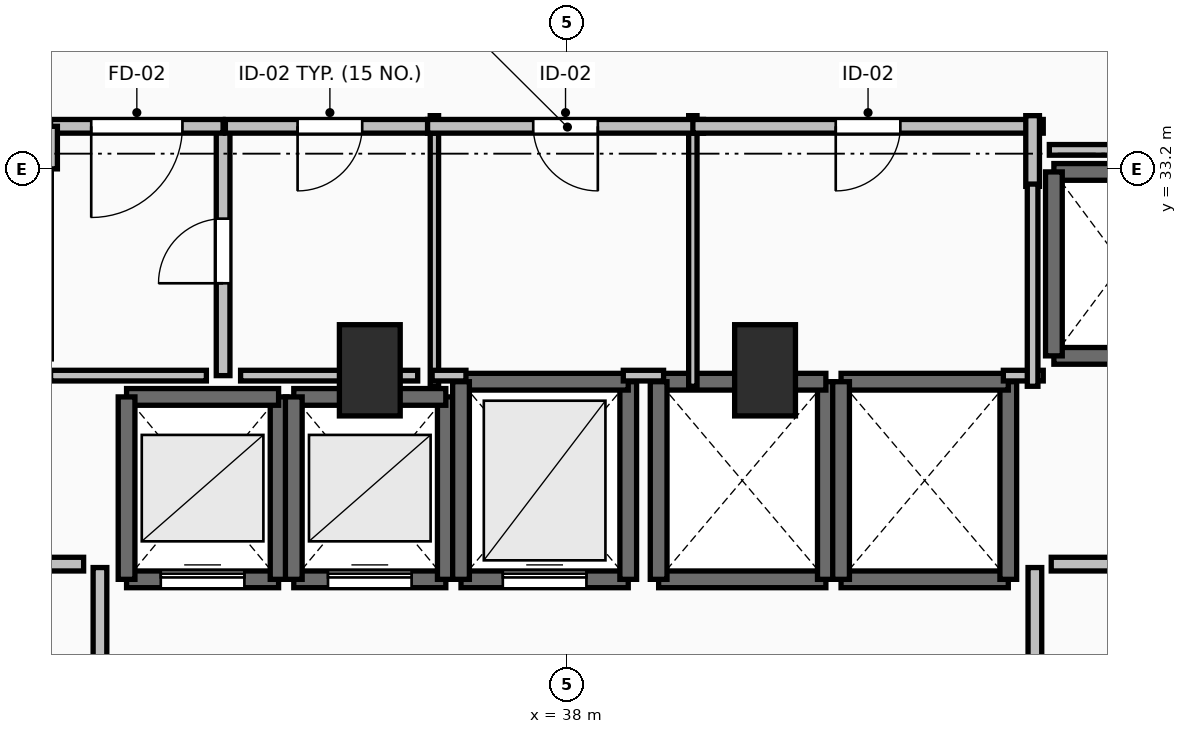
"""IFC4 building model, lengths in metres.
Left out: names, types, materials, properties, quantities, classifications, styles, units other than length and angle.
Written with IfcOpenShell. Run it as: python <this file> out.ifc"""

import sys

from ifc_helpers import new_model, si_unit, direction, frame, frame_2d, origin, origin_2d, place, context, subcontext, project, spatial, rectangle, extrude, element, fill, save


model = new_model("IFC4")
c1 = context("Model", 3, precision=1e-05, world=origin(), true_north=direction((0.0, 1.0)))
c2 = subcontext(c1, "Body", "Model", "MODEL_VIEW")
j1 = project(units=[si_unit("LENGTHUNIT", "METRE"), si_unit("PLANEANGLEUNIT", "RADIAN")], contexts=[c1])
p1 = place(None, origin())
s1 = spatial("IfcSite", under=j1, at=p1, CompositionType="ELEMENT")
p2 = place(p1, origin())
s2 = spatial("IfcBuilding", under=s1, at=p2, CompositionType="ELEMENT")
p3 = place(p2, frame((0.0, 0.0, 52.0)))
s3 = spatial("IfcBuildingStorey", under=s2, at=p3, CompositionType="ELEMENT", Elevation=52.0)
for number, where, z_axis, x_axis in (
    (1, (35.4, 30.55, 0.0), (0.0, 0.0, 1.0), (1.0, 0.0, 0.0)),
    (2, (40.6, 30.55, 0.0), (0.0, 0.0, 1.0), (1.0, 0.0, 0.0)),
):
    element("IfcColumn", number, at=place(p3, frame(where, z_axis=z_axis, x_axis=x_axis)), inside=s3, PredefinedType="PILASTER", context=c2, shape_type="SweptSolid", body=[
        extrude(rectangle(XDim=0.8, YDim=1.2, at=origin_2d()), origin(), (0.0, 0.0, 1.0), 3.5),
    ])
p4 = place(p3, frame((32.2, 27.8, 0.0), z_axis=(0.0, 0.0, 1.0), x_axis=(1.0, 0.0, 0.0)))
e3 = element("IfcWall", 3, at=p4, inside=s3, PredefinedType="SOLIDWALL", context=c2, shape_type="SweptSolid", body=[
    extrude(rectangle(XDim=2.0, YDim=0.22, at=frame_2d((1.0, 0.0))), origin(), (0.0, 0.0, 1.0), 3.24),
])
p5 = place(p4, frame((0.45, 0.0, 0.0)))
e4 = element("IfcOpeningElement", 4, at=p5, cuts=e3, PredefinedType="OPENING", context=c2, shape_type="SweptSolid", body=[
    extrude(rectangle(XDim=1.1, YDim=2.2, at=frame_2d((0.55, 1.1))), frame((0.0, 0.125, 0.0), z_axis=(0.0, -1.0, 0.0), x_axis=(1.0, 0.0, 0.0)), (0.0, 0.0, 1.0), 0.25),
])
p6 = place(p3, frame((34.2, 27.8, 0.0), z_axis=(0.0, 0.0, 1.0), x_axis=(0.0, 1.0, 0.0)))
e5 = element("IfcWall", 5, at=p6, inside=s3, PredefinedType="SOLIDWALL", context=c2, shape_type="SweptSolid", body=[
    extrude(rectangle(XDim=2.4, YDim=0.22, at=frame_2d((1.2, 0.0))), origin(), (0.0, 0.0, 1.0), 3.24),
])
p7 = place(p3, frame((34.2, 30.2, 0.0), z_axis=(0.0, 0.0, 1.0), x_axis=(-1.0, 0.0, 0.0)))
e6 = element("IfcWall", 6, at=p7, inside=s3, PredefinedType="SOLIDWALL", context=c2, shape_type="SweptSolid", body=[
    extrude(rectangle(XDim=2.0, YDim=0.22, at=frame_2d((1.0, 0.0))), origin(), (0.0, 0.0, 1.0), 3.24),
])
p8 = place(p3, frame((32.2, 30.2, 0.0), z_axis=(0.0, 0.0, 1.0), x_axis=(0.0, -1.0, 0.0)))
e7 = element("IfcWall", 7, at=p8, inside=s3, PredefinedType="SOLIDWALL", context=c2, shape_type="SweptSolid", body=[
    extrude(rectangle(XDim=2.4, YDim=0.22, at=frame_2d((1.2, 0.0))), origin(), (0.0, 0.0, 1.0), 3.24),
])
p9 = place(p3, frame((34.4, 27.8, 0.0), z_axis=(0.0, 0.0, 1.0), x_axis=(1.0, 0.0, 0.0)))
e8 = element("IfcWall", 8, at=p9, inside=s3, PredefinedType="SOLIDWALL", context=c2, shape_type="SweptSolid", body=[
    extrude(rectangle(XDim=2.0, YDim=0.22, at=frame_2d((1.0, 0.0))), origin(), (0.0, 0.0, 1.0), 3.24),
])
p10 = place(p9, frame((0.45, 0.0, 0.0)))
e9 = element("IfcOpeningElement", 9, at=p10, cuts=e8, PredefinedType="OPENING", context=c2, shape_type="SweptSolid", body=[
    extrude(rectangle(XDim=1.1, YDim=2.2, at=frame_2d((0.55, 1.1))), frame((0.0, 0.125, 0.0), z_axis=(0.0, -1.0, 0.0), x_axis=(1.0, 0.0, 0.0)), (0.0, 0.0, 1.0), 0.25),
])
p11 = place(p3, frame((36.4, 27.8, 0.0), z_axis=(0.0, 0.0, 1.0), x_axis=(0.0, 1.0, 0.0)))
e10 = element("IfcWall", 10, at=p11, inside=s3, PredefinedType="SOLIDWALL", context=c2, shape_type="SweptSolid", body=[
    extrude(rectangle(XDim=2.4, YDim=0.22, at=frame_2d((1.2, 0.0))), origin(), (0.0, 0.0, 1.0), 3.24),
])
p12 = place(p3, frame((36.4, 30.2, 0.0), z_axis=(0.0, 0.0, 1.0), x_axis=(-1.0, 0.0, 0.0)))
e11 = element("IfcWall", 11, at=p12, inside=s3, PredefinedType="SOLIDWALL", context=c2, shape_type="SweptSolid", body=[
    extrude(rectangle(XDim=2.0, YDim=0.22, at=frame_2d((1.0, 0.0))), origin(), (0.0, 0.0, 1.0), 3.24),
])
p13 = place(p3, frame((34.4, 30.2, 0.0), z_axis=(0.0, 0.0, 1.0), x_axis=(0.0, -1.0, 0.0)))
e12 = element("IfcWall", 12, at=p13, inside=s3, PredefinedType="SOLIDWALL", context=c2, shape_type="SweptSolid", body=[
    extrude(rectangle(XDim=2.4, YDim=0.22, at=frame_2d((1.2, 0.0))), origin(), (0.0, 0.0, 1.0), 3.24),
])
p14 = place(p3, frame((36.6, 27.8, 0.0), z_axis=(0.0, 0.0, 1.0), x_axis=(1.0, 0.0, 0.0)))
e13 = element("IfcWall", 13, at=p14, inside=s3, PredefinedType="SOLIDWALL", context=c2, shape_type="SweptSolid", body=[
    extrude(rectangle(XDim=2.2, YDim=0.22, at=frame_2d((1.1, 0.0))), origin(), (0.0, 0.0, 1.0), 3.24),
])
p15 = place(p14, frame((0.55, 0.0, 0.0)))
e14 = element("IfcOpeningElement", 14, at=p15, cuts=e13, PredefinedType="OPENING", context=c2, shape_type="SweptSolid", body=[
    extrude(rectangle(XDim=1.1, YDim=2.2, at=frame_2d((0.55, 1.1))), frame((0.0, 0.125, 0.0), z_axis=(0.0, -1.0, 0.0), x_axis=(1.0, 0.0, 0.0)), (0.0, 0.0, 1.0), 0.25),
])
p16 = place(p3, frame((38.8, 27.8, 0.0), z_axis=(0.0, 0.0, 1.0), x_axis=(0.0, 1.0, 0.0)))
e15 = element("IfcWall", 15, at=p16, inside=s3, PredefinedType="SOLIDWALL", context=c2, shape_type="SweptSolid", body=[
    extrude(rectangle(XDim=2.6, YDim=0.22, at=frame_2d((1.3, 0.0))), origin(), (0.0, 0.0, 1.0), 3.24),
])
p17 = place(p3, frame((38.8, 30.4, 0.0), z_axis=(0.0, 0.0, 1.0), x_axis=(-1.0, 0.0, 0.0)))
e16 = element("IfcWall", 16, at=p17, inside=s3, PredefinedType="SOLIDWALL", context=c2, shape_type="SweptSolid", body=[
    extrude(rectangle(XDim=2.2, YDim=0.22, at=frame_2d((1.1, 0.0))), origin(), (0.0, 0.0, 1.0), 3.24),
])
p18 = place(p3, frame((36.6, 30.4, 0.0), z_axis=(0.0, 0.0, 1.0), x_axis=(0.0, -1.0, 0.0)))
e17 = element("IfcWall", 17, at=p18, inside=s3, PredefinedType="SOLIDWALL", context=c2, shape_type="SweptSolid", body=[
    extrude(rectangle(XDim=2.6, YDim=0.22, at=frame_2d((1.3, 0.0))), origin(), (0.0, 0.0, 1.0), 3.24),
])
p19 = place(p3, frame((39.2, 27.8, 0.0), z_axis=(0.0, 0.0, 1.0), x_axis=(1.0, 0.0, 0.0)))
e18 = element("IfcWall", 18, at=p19, inside=s3, PredefinedType="SOLIDWALL", context=c2, shape_type="SweptSolid", body=[
    extrude(rectangle(XDim=2.2, YDim=0.22, at=frame_2d((1.1, 0.0))), origin(), (0.0, 0.0, 1.0), 3.24),
])
p20 = place(p3, frame((41.4, 27.8, 0.0), z_axis=(0.0, 0.0, 1.0), x_axis=(0.0, 1.0, 0.0)))
e19 = element("IfcWall", 19, at=p20, inside=s3, PredefinedType="SOLIDWALL", context=c2, shape_type="SweptSolid", body=[
    extrude(rectangle(XDim=2.6, YDim=0.22, at=frame_2d((1.3, 0.0))), origin(), (0.0, 0.0, 1.0), 3.24),
])
p21 = place(p3, frame((41.4, 30.4, 0.0), z_axis=(0.0, 0.0, 1.0), x_axis=(-1.0, 0.0, 0.0)))
e20 = element("IfcWall", 20, at=p21, inside=s3, PredefinedType="SOLIDWALL", context=c2, shape_type="SweptSolid", body=[
    extrude(rectangle(XDim=2.2, YDim=0.22, at=frame_2d((1.1, 0.0))), origin(), (0.0, 0.0, 1.0), 3.24),
])
p22 = place(p3, frame((39.2, 30.4, 0.0), z_axis=(0.0, 0.0, 1.0), x_axis=(0.0, -1.0, 0.0)))
e21 = element("IfcWall", 21, at=p22, inside=s3, PredefinedType="SOLIDWALL", context=c2, shape_type="SweptSolid", body=[
    extrude(rectangle(XDim=2.6, YDim=0.22, at=frame_2d((1.3, 0.0))), origin(), (0.0, 0.0, 1.0), 3.24),
])
p23 = place(p3, frame((41.6, 27.8, 0.0), z_axis=(0.0, 0.0, 1.0), x_axis=(1.0, 0.0, 0.0)))
e22 = element("IfcWall", 22, at=p23, inside=s3, PredefinedType="SOLIDWALL", context=c2, shape_type="SweptSolid", body=[
    extrude(rectangle(XDim=2.2, YDim=0.22, at=frame_2d((1.1, 0.0))), origin(), (0.0, 0.0, 1.0), 3.24),
])
p24 = place(p3, frame((43.8, 27.8, 0.0), z_axis=(0.0, 0.0, 1.0), x_axis=(0.0, 1.0, 0.0)))
e23 = element("IfcWall", 23, at=p24, inside=s3, PredefinedType="SOLIDWALL", context=c2, shape_type="SweptSolid", body=[
    extrude(rectangle(XDim=2.6, YDim=0.22, at=frame_2d((1.3, 0.0))), origin(), (0.0, 0.0, 1.0), 3.24),
])
p25 = place(p3, frame((43.8, 30.4, 0.0), z_axis=(0.0, 0.0, 1.0), x_axis=(-1.0, 0.0, 0.0)))
e24 = element("IfcWall", 24, at=p25, inside=s3, PredefinedType="SOLIDWALL", context=c2, shape_type="SweptSolid", body=[
    extrude(rectangle(XDim=2.2, YDim=0.22, at=frame_2d((1.1, 0.0))), origin(), (0.0, 0.0, 1.0), 3.24),
])
p26 = place(p3, frame((41.6, 30.4, 0.0), z_axis=(0.0, 0.0, 1.0), x_axis=(0.0, -1.0, 0.0)))
e25 = element("IfcWall", 25, at=p26, inside=s3, PredefinedType="SOLIDWALL", context=c2, shape_type="SweptSolid", body=[
    extrude(rectangle(XDim=2.6, YDim=0.22, at=frame_2d((1.3, 0.0))), origin(), (0.0, 0.0, 1.0), 3.24),
])
for number, where, z_axis, x_axis in (
    (26, (44.4, 30.74, 0.0), (0.0, 0.0, 1.0), (1.0, 0.0, 0.0)),
    (27, (46.2, 33.16, 0.0), (0.0, 0.0, 1.0), (-1.0, 0.0, 0.0)),
):
    element("IfcWall", number, at=place(p3, frame(where, z_axis=z_axis, x_axis=x_axis)), inside=s3, PredefinedType="SOLIDWALL", context=c2, shape_type="SweptSolid", body=[
        extrude(rectangle(XDim=1.8, YDim=0.22, at=frame_2d((0.9, 0.0))), origin(), (0.0, 0.0, 1.0), 3.24),
    ])
p27 = place(p3, frame((44.4, 33.16, 0.0), z_axis=(0.0, 0.0, 1.0), x_axis=(0.0, -1.0, 0.0)))
e28 = element("IfcWall", 28, at=p27, inside=s3, PredefinedType="SOLIDWALL", context=c2, shape_type="SweptSolid", body=[
    extrude(rectangle(XDim=2.42, YDim=0.22, at=frame_2d((1.21, 0.0))), origin(), (0.0, 0.0, 1.0), 3.24),
])
p28 = place(p3, frame((31.85, 24.045, 0.0), z_axis=(0.0, 0.0, 1.0), x_axis=(0.0, 1.0, 0.0)))
e29 = element("IfcWall", 29, at=p28, inside=s3, PredefinedType="PARTITIONING", context=c2, shape_type="SweptSolid", body=[
    extrude(rectangle(XDim=3.91, YDim=0.18, at=frame_2d((1.955, 0.0))), origin(), (0.0, 0.0, 1.0), 3.24),
])
p29 = place(p28, frame((1.355, 0.0, 0.0)))
e30 = element("IfcOpeningElement", 30, at=p29, cuts=e29, PredefinedType="OPENING", context=c2, shape_type="SweptSolid", body=[
    extrude(rectangle(XDim=1.2, YDim=2.15, at=frame_2d((0.6, 1.075))), frame((0.0, 0.105, 0.0), z_axis=(0.0, -1.0, 0.0), x_axis=(1.0, 0.0, 0.0)), (0.0, 0.0, 1.0), 0.21),
])
p30 = place(p3, frame((44.15, 27.955, 0.0), z_axis=(0.0, 0.0, 1.0), x_axis=(0.0, -1.0, 0.0)))
e31 = element("IfcWall", 31, at=p30, inside=s3, PredefinedType="PARTITIONING", context=c2, shape_type="SweptSolid", body=[
    extrude(rectangle(XDim=3.91, YDim=0.18, at=frame_2d((1.955, 0.0))), origin(), (0.0, 0.0, 1.0), 3.24),
])
p31 = place(p30, frame((1.355, 0.0, 0.0)))
e32 = element("IfcOpeningElement", 32, at=p31, cuts=e31, PredefinedType="OPENING", context=c2, shape_type="SweptSolid", body=[
    extrude(rectangle(XDim=1.2, YDim=2.15, at=frame_2d((0.6, 1.075))), frame((0.0, 0.105, 0.0), z_axis=(0.0, -1.0, 0.0), x_axis=(1.0, 0.0, 0.0)), (0.0, 0.0, 1.0), 0.21),
])
p32 = place(p3, frame((33.47, 30.48, 0.0), z_axis=(0.0, 0.0, 1.0), x_axis=(0.0, 1.0, 0.0)))
e33 = element("IfcWall", 33, at=p32, inside=s3, PredefinedType="PARTITIONING", context=c2, shape_type="SweptSolid", body=[
    extrude(rectangle(XDim=3.28, YDim=0.18, at=frame_2d((1.64, 0.0))), origin(), (0.0, 0.0, 1.0), 3.24),
])
p33 = place(p32, frame((1.215, 0.0, 0.0)))
e34 = element("IfcOpeningElement", 34, at=p33, cuts=e33, PredefinedType="OPENING", context=c2, shape_type="SweptSolid", body=[
    extrude(rectangle(XDim=0.85, YDim=2.1, at=frame_2d((0.425, 1.05))), frame((0.0, 0.105, 0.0), z_axis=(0.0, -1.0, 0.0), x_axis=(1.0, 0.0, 0.0)), (0.0, 0.0, 1.0), 0.21),
])
p34 = place(p3, frame((33.47, 33.76, 0.0), z_axis=(0.0, 0.0, 1.0), x_axis=(-1.0, 0.0, 0.0)))
e35 = element("IfcWall", 35, at=p34, inside=s3, PredefinedType="PARTITIONING", context=c2, shape_type="SweptSolid", body=[
    extrude(rectangle(XDim=2.27, YDim=0.18, at=frame_2d((1.135, 0.0))), origin(), (0.0, 0.0, 1.0), 3.24),
])
p35 = place(p34, frame((0.535, 0.0, 0.0)))
e36 = element("IfcOpeningElement", 36, at=p35, cuts=e35, PredefinedType="OPENING", context=c2, shape_type="SweptSolid", body=[
    extrude(rectangle(XDim=1.2, YDim=2.15, at=frame_2d((0.6, 1.075))), frame((0.0, 0.105, 0.0), z_axis=(0.0, -1.0, 0.0), x_axis=(1.0, 0.0, 0.0)), (0.0, 0.0, 1.0), 0.21),
])
p36 = place(p3, frame((31.2, 33.76, 0.0), z_axis=(0.0, 0.0, 1.0), x_axis=(0.0, -1.0, 0.0)))
e37 = element("IfcWall", 37, at=p36, inside=s3, PredefinedType="PARTITIONING", context=c2, shape_type="SweptSolid", body=[
    extrude(rectangle(XDim=0.56, YDim=0.18, at=frame_2d((0.28, 0.0))), origin(), (0.0, 0.0, 1.0), 3.24),
])
p37 = place(p3, frame((36.25, 30.34, 0.0), z_axis=(0.0, 0.0, 1.0), x_axis=(0.0, 1.0, 0.0)))
e38 = element("IfcWall", 38, at=p37, inside=s3, PredefinedType="PARTITIONING", context=c2, shape_type="SweptSolid", body=[
    extrude(rectangle(XDim=3.56, YDim=0.11, at=frame_2d((1.78, 0.0))), origin(), (0.0, 0.0, 1.0), 2.432),
])
p38 = place(p3, frame((36.25, 33.76, 0.0), z_axis=(0.0, 0.0, 1.0), x_axis=(-1.0, 0.0, 0.0)))
e39 = element("IfcWall", 39, at=p38, inside=s3, PredefinedType="PARTITIONING", context=c2, shape_type="SweptSolid", body=[
    extrude(rectangle(XDim=2.75, YDim=0.18, at=frame_2d((1.375, 0.0))), origin(), (0.0, 0.0, 1.0), 3.24),
])
p39 = place(p38, frame((0.95, 0.0, 0.0)))
e40 = element("IfcOpeningElement", 40, at=p39, cuts=e39, PredefinedType="OPENING", context=c2, shape_type="SweptSolid", body=[
    extrude(rectangle(XDim=0.85, YDim=2.1, at=frame_2d((0.425, 1.05))), frame((0.0, 0.105, 0.0), z_axis=(0.0, -1.0, 0.0), x_axis=(1.0, 0.0, 0.0)), (0.0, 0.0, 1.0), 0.21),
])
p40 = place(p3, frame((39.65, 30.34, 0.0), z_axis=(0.0, 0.0, 1.0), x_axis=(0.0, 1.0, 0.0)))
e41 = element("IfcWall", 41, at=p40, inside=s3, PredefinedType="PARTITIONING", context=c2, shape_type="SweptSolid", body=[
    extrude(rectangle(XDim=3.56, YDim=0.11, at=frame_2d((1.78, 0.0))), origin(), (0.0, 0.0, 1.0), 2.432),
])
p41 = place(p3, frame((39.79, 33.76, 0.0), z_axis=(0.0, 0.0, 1.0), x_axis=(-1.0, 0.0, 0.0)))
e42 = element("IfcWall", 42, at=p41, inside=s3, PredefinedType="PARTITIONING", context=c2, shape_type="SweptSolid", body=[
    extrude(rectangle(XDim=3.63, YDim=0.18, at=frame_2d((1.815, 0.0))), origin(), (0.0, 0.0, 1.0), 3.24),
])
p42 = place(p41, frame((1.39, 0.0, 0.0)))
e43 = element("IfcOpeningElement", 43, at=p42, cuts=e42, PredefinedType="OPENING", context=c2, shape_type="SweptSolid", body=[
    extrude(rectangle(XDim=0.85, YDim=2.1, at=frame_2d((0.425, 1.05))), frame((0.0, 0.105, 0.0), z_axis=(0.0, -1.0, 0.0), x_axis=(1.0, 0.0, 0.0)), (0.0, 0.0, 1.0), 0.21),
])
p43 = place(p3, frame((44.26, 33.76, 0.0), z_axis=(0.0, 0.0, 1.0), x_axis=(-1.0, 0.0, 0.0)))
e44 = element("IfcWall", 44, at=p43, inside=s3, PredefinedType="PARTITIONING", context=c2, shape_type="SweptSolid", body=[
    extrude(rectangle(XDim=4.61, YDim=0.18, at=frame_2d((2.305, 0.0))), origin(), (0.0, 0.0, 1.0), 3.24),
])
p44 = place(p43, frame((1.88, 0.0, 0.0)))
e45 = element("IfcOpeningElement", 45, at=p44, cuts=e44, PredefinedType="OPENING", context=c2, shape_type="SweptSolid", body=[
    extrude(rectangle(XDim=0.85, YDim=2.1, at=frame_2d((0.425, 1.05))), frame((0.0, 0.105, 0.0), z_axis=(0.0, -1.0, 0.0), x_axis=(1.0, 0.0, 0.0)), (0.0, 0.0, 1.0), 0.21),
])
p45 = place(p3, frame((44.12, 32.97, 0.0), z_axis=(0.0, 0.0, 1.0), x_axis=(0.0, 1.0, 0.0)))
e46 = element("IfcWall", 46, at=p45, inside=s3, PredefinedType="PARTITIONING", context=c2, shape_type="SweptSolid", body=[
    extrude(rectangle(XDim=0.93, YDim=0.18, at=frame_2d((0.465, 0.0))), origin(), (0.0, 0.0, 1.0), 3.24),
])
for number, where, z_axis, x_axis in (
    (47, (31.635, 28.0, 0.0), (0.0, 0.0, 1.0), (-1.0, 0.0, 0.0)),
    (48, (45.28, 28.0, 0.0), (0.0, 0.0, 1.0), (-1.0, 0.0, 0.0)),
):
    element("IfcWall", number, at=place(p3, frame(where, z_axis=z_axis, x_axis=x_axis)), inside=s3, PredefinedType="PARTITIONING", context=c2, shape_type="SweptSolid", body=[
        extrude(rectangle(XDim=0.915, YDim=0.18, at=frame_2d((0.458, 0.0))), origin(), (0.0, 0.0, 1.0), 3.24),
    ])
p46 = place(p3, frame((31.2, 30.48, 0.0), z_axis=(0.0, 0.0, 1.0), x_axis=(1.0, 0.0, 0.0)))
e49 = element("IfcWall", 49, at=p46, inside=s3, PredefinedType="PARTITIONING", context=c2, shape_type="SweptSolid", body=[
    extrude(rectangle(XDim=2.05, YDim=0.14, at=frame_2d((1.025, 0.0))), origin(), (0.0, 0.0, 1.0), 3.24),
])
p47 = place(p3, frame((33.7, 30.48, 0.0), z_axis=(0.0, 0.0, 1.0), x_axis=(1.0, 0.0, 0.0)))
e50 = element("IfcWall", 50, at=p47, inside=s3, PredefinedType="PARTITIONING", context=c2, shape_type="SweptSolid", body=[
    extrude(rectangle(XDim=2.33, YDim=0.14, at=frame_2d((1.165, 0.0))), origin(), (0.0, 0.0, 1.0), 2.432),
])
p48 = place(p3, frame((36.22, 30.48, 0.0), z_axis=(0.0, 0.0, 1.0), x_axis=(1.0, 0.0, 0.0)))
e51 = element("IfcWall", 51, at=p48, inside=s3, PredefinedType="PARTITIONING", context=c2, shape_type="SweptSolid", body=[
    extrude(rectangle(XDim=0.445, YDim=0.14, at=frame_2d((0.223, 0.0))), origin(), (0.0, 0.0, 1.0), 2.432),
])
p49 = place(p3, frame((38.735, 30.48, 0.0), z_axis=(0.0, 0.0, 1.0), x_axis=(1.0, 0.0, 0.0)))
e52 = element("IfcWall", 52, at=p49, inside=s3, PredefinedType="PARTITIONING", context=c2, shape_type="SweptSolid", body=[
    extrude(rectangle(XDim=0.53, YDim=0.14, at=frame_2d((0.265, 0.0))), origin(), (0.0, 0.0, 1.0), 2.432),
])
p50 = place(p3, frame((43.735, 30.48, 0.0), z_axis=(0.0, 0.0, 1.0), x_axis=(1.0, 0.0, 0.0)))
e53 = element("IfcWall", 53, at=p50, inside=s3, PredefinedType="PARTITIONING", context=c2, shape_type="SweptSolid", body=[
    extrude(rectangle(XDim=0.525, YDim=0.14, at=frame_2d((0.262, 0.0))), origin(), (0.0, 0.0, 1.0), 3.24),
])
p51 = place(p3, frame((44.12, 30.34, 0.0), z_axis=(0.0, 0.0, 1.0), x_axis=(0.0, 1.0, 0.0)))
e54 = element("IfcWall", 54, at=p51, inside=s3, PredefinedType="PARTITIONING", context=c2, shape_type="SweptSolid", body=[
    extrude(rectangle(XDim=2.66, YDim=0.14, at=frame_2d((1.33, 0.0))), origin(), (0.0, 0.0, 1.0), 3.24),
])
p52 = place(p3, frame((44.34, 33.45, 0.0), z_axis=(0.0, 0.0, 1.0), x_axis=(1.0, 0.0, 0.0)))
e55 = element("IfcWall", 55, at=p52, inside=s3, PredefinedType="PARTITIONING", context=c2, shape_type="SweptSolid", body=[
    extrude(rectangle(XDim=4.21, YDim=0.14, at=frame_2d((2.105, 0.0))), origin(), (0.0, 0.0, 1.0), 2.432),
])
p53 = place(p5, origin())
e56 = element("IfcDoor", 56, at=p53, inside=s3, OperationType="SLIDING_TO_LEFT", PredefinedType="DOOR", context=c2, shape_type="SweptSolid", body=[
    extrude(rectangle(XDim=1.1, YDim=2.2, at=frame_2d((0.55, 1.1))), frame((0.0, 0.025, 0.0), z_axis=(0.0, -1.0, 0.0), x_axis=(1.0, 0.0, 0.0)), (0.0, 0.0, 1.0), 0.05),
])
fill(e4, e56)
p54 = place(p10, origin())
e57 = element("IfcDoor", 57, at=p54, inside=s3, OperationType="SLIDING_TO_LEFT", PredefinedType="DOOR", context=c2, shape_type="SweptSolid", body=[
    extrude(rectangle(XDim=1.1, YDim=2.2, at=frame_2d((0.55, 1.1))), frame((0.0, 0.025, 0.0), z_axis=(0.0, -1.0, 0.0), x_axis=(1.0, 0.0, 0.0)), (0.0, 0.0, 1.0), 0.05),
])
fill(e9, e57)
p55 = place(p15, origin())
e58 = element("IfcDoor", 58, at=p55, inside=s3, OperationType="SLIDING_TO_LEFT", PredefinedType="DOOR", context=c2, shape_type="SweptSolid", body=[
    extrude(rectangle(XDim=1.1, YDim=2.2, at=frame_2d((0.55, 1.1))), frame((0.0, 0.025, 0.0), z_axis=(0.0, -1.0, 0.0), x_axis=(1.0, 0.0, 0.0)), (0.0, 0.0, 1.0), 0.05),
])
fill(e14, e58)
p56 = place(p33, origin())
e59 = element("IfcDoor", 59, at=p56, inside=s3, OperationType="SINGLE_SWING_LEFT", PredefinedType="DOOR", context=c2, shape_type="SweptSolid", body=[
    extrude(rectangle(XDim=0.85, YDim=2.1, at=frame_2d((0.425, 1.05))), frame((0.0, 0.025, 0.0), z_axis=(0.0, -1.0, 0.0), x_axis=(1.0, 0.0, 0.0)), (0.0, 0.0, 1.0), 0.05),
])
fill(e34, e59)
p57 = place(p35, origin())
e60 = element("IfcDoor", 60, at=p57, inside=s3, OperationType="SINGLE_SWING_RIGHT", PredefinedType="DOOR", context=c2, shape_type="SweptSolid", body=[
    extrude(rectangle(XDim=1.2, YDim=2.15, at=frame_2d((0.6, 1.075))), frame((0.0, 0.025, 0.0), z_axis=(0.0, -1.0, 0.0), x_axis=(1.0, 0.0, 0.0)), (0.0, 0.0, 1.0), 0.05),
])
fill(e36, e60)
p58 = place(p39, origin())
e61 = element("IfcDoor", 61, at=p58, inside=s3, OperationType="SINGLE_SWING_RIGHT", PredefinedType="DOOR", context=c2, shape_type="SweptSolid", body=[
    extrude(rectangle(XDim=0.85, YDim=2.1, at=frame_2d((0.425, 1.05))), frame((0.0, 0.025, 0.0), z_axis=(0.0, -1.0, 0.0), x_axis=(1.0, 0.0, 0.0)), (0.0, 0.0, 1.0), 0.05),
])
fill(e40, e61)
p59 = place(p42, origin())
e62 = element("IfcDoor", 62, at=p59, inside=s3, OperationType="SINGLE_SWING_LEFT", PredefinedType="DOOR", context=c2, shape_type="SweptSolid", body=[
    extrude(rectangle(XDim=0.85, YDim=2.1, at=frame_2d((0.425, 1.05))), frame((0.0, 0.025, 0.0), z_axis=(0.0, -1.0, 0.0), x_axis=(1.0, 0.0, 0.0)), (0.0, 0.0, 1.0), 0.05),
])
fill(e43, e62)
p60 = place(p44, origin())
e63 = element("IfcDoor", 63, at=p60, inside=s3, OperationType="SINGLE_SWING_RIGHT", PredefinedType="DOOR", context=c2, shape_type="SweptSolid", body=[
    extrude(rectangle(XDim=0.85, YDim=2.1, at=frame_2d((0.425, 1.05))), frame((0.0, 0.025, 0.0), z_axis=(0.0, -1.0, 0.0), x_axis=(1.0, 0.0, 0.0)), (0.0, 0.0, 1.0), 0.05),
])
fill(e45, e63)
save(model, sys.argv[1])
